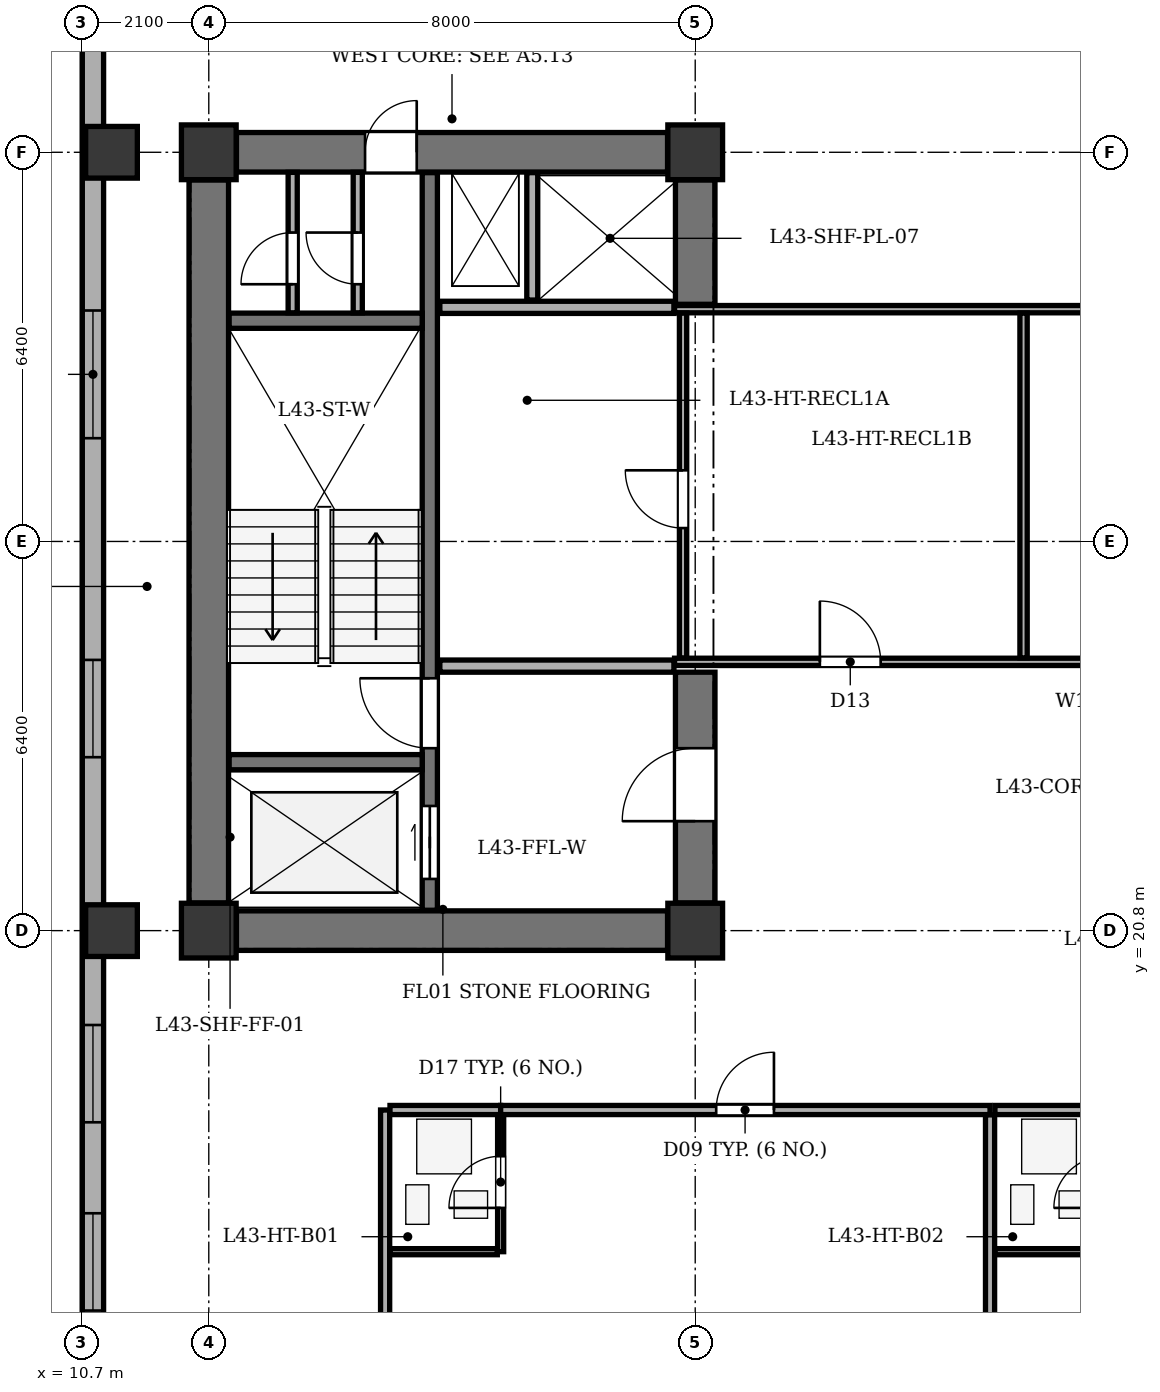
"""IFC4 building model, lengths in metres.
Left out: names, types, materials, properties, quantities, classifications, styles, units other than length and angle.
Written with IfcOpenShell. Run it as: python <this file> out.ifc"""

import sys

from ifc_helpers import new_model, si_unit, direction, frame, frame_2d, origin, origin_2d, place, context, subcontext, project, spatial, rectangle, extrude, element, fill, save


model = new_model("IFC4")
c1 = context("Model", 3, precision=1e-05, world=origin(), true_north=direction((0.0, 1.0)))
c2 = subcontext(c1, "Body", "Model", "MODEL_VIEW")
j1 = project(units=[si_unit("LENGTHUNIT", "METRE"), si_unit("PLANEANGLEUNIT", "RADIAN")], contexts=[c1])
p1 = place(None, origin())
s1 = spatial("IfcSite", under=j1, at=p1, CompositionType="ELEMENT")
p2 = place(p1, origin())
s2 = spatial("IfcBuilding", under=s1, at=p2, CompositionType="ELEMENT")
p3 = place(p2, frame((0.0, 0.0, 169.3)))
s3 = spatial("IfcBuildingStorey", under=s2, at=p3, CompositionType="ELEMENT", Elevation=169.3)
for number, where, z_axis, x_axis in (
    (1, (12.8, 20.8, 0.0), (0.0, 0.0, 1.0), (1.0, 0.0, 0.0)),
    (2, (20.8, 20.8, 0.0), (0.0, 0.0, 1.0), (1.0, 0.0, 0.0)),
    (3, (12.8, 33.6, 0.0), (0.0, 0.0, 1.0), (1.0, 0.0, 0.0)),
    (4, (20.8, 33.6, 0.0), (0.0, 0.0, 1.0), (1.0, 0.0, 0.0)),
):
    element("IfcColumn", number, at=place(p3, frame(where, z_axis=z_axis, x_axis=x_axis)), inside=s3, PredefinedType="COLUMN", context=c2, shape_type="SweptSolid", body=[
        extrude(rectangle(XDim=0.9, YDim=0.9, at=origin_2d()), origin(), (0.0, 0.0, 1.0), 3.5),
    ])
for number, where, z_axis, x_axis in (
    (5, (11.2, 20.8, 0.0), (0.0, 0.0, 1.0), (1.0, 0.0, 0.0)),
    (6, (11.2, 33.6, 0.0), (0.0, 0.0, 1.0), (1.0, 0.0, 0.0)),
):
    element("IfcColumn", number, at=place(p3, frame(where, z_axis=z_axis, x_axis=x_axis)), inside=s3, PredefinedType="COLUMN", context=c2, shape_type="SweptSolid", body=[
        extrude(rectangle(XDim=0.85, YDim=0.85, at=origin_2d()), origin(), (0.0, 0.0, 1.0), 3.5),
    ])
p4 = place(p3, frame((10.895, 12.9, 0.0), z_axis=(0.0, 0.0, 1.0), x_axis=(0.0, 1.0, 0.0)))
e7 = element("IfcWall", 7, at=p4, inside=s3, PredefinedType="STANDARD", context=c2, shape_type="SweptSolid", body=[
    extrude(rectangle(XDim=35.0, YDim=0.35, at=frame_2d((17.5, 0.0))), origin(), (0.0, 0.0, 1.0), 2.785),
])
p5 = place(p4, frame((1.652, 0.0, 0.75)))
e8 = element("IfcOpeningElement", 8, at=p5, cuts=e7, PredefinedType="OPENING", context=c2, shape_type="SweptSolid", body=[
    extrude(rectangle(XDim=1.6, YDim=1.75, at=frame_2d((0.8, 0.875))), frame((0.0, 0.185, 0.0), z_axis=(0.0, -1.0, 0.0), x_axis=(1.0, 0.0, 0.0)), (0.0, 0.0, 1.0), 0.37),
])
p6 = place(p4, frame((4.748, 0.0, 0.75)))
e9 = element("IfcOpeningElement", 9, at=p6, cuts=e7, PredefinedType="OPENING", context=c2, shape_type="SweptSolid", body=[
    extrude(rectangle(XDim=1.6, YDim=1.75, at=frame_2d((0.8, 0.875))), frame((0.0, 0.185, 0.0), z_axis=(0.0, -1.0, 0.0), x_axis=(1.0, 0.0, 0.0)), (0.0, 0.0, 1.0), 0.37),
])
p7 = place(p4, frame((10.752, 0.0, 0.75)))
e10 = element("IfcOpeningElement", 10, at=p7, cuts=e7, PredefinedType="OPENING", context=c2, shape_type="SweptSolid", body=[
    extrude(rectangle(XDim=1.6, YDim=1.75, at=frame_2d((0.8, 0.875))), frame((0.0, 0.185, 0.0), z_axis=(0.0, -1.0, 0.0), x_axis=(1.0, 0.0, 0.0)), (0.0, 0.0, 1.0), 0.37),
])
p8 = place(p4, frame((15.998, 0.0, 0.75)))
e11 = element("IfcOpeningElement", 11, at=p8, cuts=e7, PredefinedType="OPENING", context=c2, shape_type="SweptSolid", body=[
    extrude(rectangle(XDim=2.1, YDim=1.75, at=frame_2d((1.05, 0.875))), frame((0.0, 0.185, 0.0), z_axis=(0.0, -1.0, 0.0), x_axis=(1.0, 0.0, 0.0)), (0.0, 0.0, 1.0), 0.37),
])
p9 = place(p4, frame((23.916, 0.0, 0.75)))
e12 = element("IfcOpeningElement", 12, at=p9, cuts=e7, PredefinedType="OPENING", context=c2, shape_type="SweptSolid", body=[
    extrude(rectangle(XDim=1.6, YDim=1.75, at=frame_2d((0.8, 0.875))), frame((0.0, 0.185, 0.0), z_axis=(0.0, -1.0, 0.0), x_axis=(1.0, 0.0, 0.0)), (0.0, 0.0, 1.0), 0.37),
])
p10 = place(p4, frame((29.834, 0.0, 0.75)))
e13 = element("IfcOpeningElement", 13, at=p10, cuts=e7, PredefinedType="OPENING", context=c2, shape_type="SweptSolid", body=[
    extrude(rectangle(XDim=2.1, YDim=1.75, at=frame_2d((1.05, 0.875))), frame((0.0, 0.185, 0.0), z_axis=(0.0, -1.0, 0.0), x_axis=(1.0, 0.0, 0.0)), (0.0, 0.0, 1.0), 0.37),
])
p11 = place(p3, frame((12.8, 21.255, 0.0), z_axis=(0.0, 0.0, 1.0), x_axis=(0.0, 1.0, 0.0)))
e14 = element("IfcWall", 14, at=p11, inside=s3, PredefinedType="SHEAR", context=c2, shape_type="SweptSolid", body=[
    extrude(rectangle(XDim=11.89, YDim=0.65, at=frame_2d((5.945, 0.0))), origin(), (0.0, 0.0, 1.0), 3.2),
])
p12 = place(p3, frame((13.255, 20.8, 0.0), z_axis=(0.0, 0.0, 1.0), x_axis=(1.0, 0.0, 0.0)))
e15 = element("IfcWall", 15, at=p12, inside=s3, PredefinedType="SHEAR", context=c2, shape_type="SweptSolid", body=[
    extrude(rectangle(XDim=7.09, YDim=0.65, at=frame_2d((3.545, 0.0))), origin(), (0.0, 0.0, 1.0), 3.2),
])
p13 = place(p3, frame((13.255, 33.6, 0.0), z_axis=(0.0, 0.0, 1.0), x_axis=(1.0, 0.0, 0.0)))
e16 = element("IfcWall", 16, at=p13, inside=s3, PredefinedType="SHEAR", context=c2, shape_type="SweptSolid", body=[
    extrude(rectangle(XDim=7.09, YDim=0.65, at=frame_2d((3.545, 0.0))), origin(), (0.0, 0.0, 1.0), 3.2),
])
p14 = place(p13, frame((2.115, 0.0, 0.0)))
e17 = element("IfcOpeningElement", 17, at=p14, cuts=e16, PredefinedType="OPENING", context=c2, shape_type="SweptSolid", body=[
    extrude(rectangle(XDim=0.85, YDim=2.02, at=frame_2d((0.425, 1.01))), frame((0.0, 0.335, 0.0), z_axis=(0.0, -1.0, 0.0), x_axis=(1.0, 0.0, 0.0)), (0.0, 0.0, 1.0), 0.67),
])
p15 = place(p3, frame((20.8, 21.255, 0.0), z_axis=(0.0, 0.0, 1.0), x_axis=(0.0, 1.0, 0.0)))
e18 = element("IfcWall", 18, at=p15, inside=s3, PredefinedType="SHEAR", context=c2, shape_type="SweptSolid", body=[
    extrude(rectangle(XDim=3.795, YDim=0.65, at=frame_2d((1.897, 0.0))), origin(), (0.0, 0.0, 1.0), 3.2),
])
p16 = place(p15, frame((1.345, 0.0, 0.0)))
e19 = element("IfcOpeningElement", 19, at=p16, cuts=e18, PredefinedType="OPENING", context=c2, shape_type="SweptSolid", body=[
    extrude(rectangle(XDim=1.2, YDim=2.15, at=frame_2d((0.6, 1.075))), frame((0.0, 0.335, 0.0), z_axis=(0.0, -1.0, 0.0), x_axis=(1.0, 0.0, 0.0)), (0.0, 0.0, 1.0), 0.67),
])
p17 = place(p3, frame((20.8, 31.1, 0.0), z_axis=(0.0, 0.0, 1.0), x_axis=(0.0, 1.0, 0.0)))
e20 = element("IfcWall", 20, at=p17, inside=s3, PredefinedType="SHEAR", context=c2, shape_type="SweptSolid", body=[
    extrude(rectangle(XDim=2.045, YDim=0.65, at=frame_2d((1.022, 0.0))), origin(), (0.0, 0.0, 1.0), 3.2),
])
p18 = place(p3, frame((16.435, 21.135, 0.0), z_axis=(0.0, 0.0, 1.0), x_axis=(0.0, 1.0, 0.0)))
e21 = element("IfcWall", 21, at=p18, inside=s3, PredefinedType="SHEAR", context=c2, shape_type="SweptSolid", body=[
    extrude(rectangle(XDim=12.13, YDim=0.25, at=frame_2d((6.065, 0.0))), origin(), (0.0, 0.0, 1.0), 3.2),
])
p19 = place(p18, frame((0.515, 0.0, 0.0)))
e22 = element("IfcOpeningElement", 22, at=p19, cuts=e21, PredefinedType="OPENING", context=c2, shape_type="SweptSolid", body=[
    extrude(rectangle(XDim=1.2, YDim=2.15, at=frame_2d((0.6, 1.075))), frame((0.0, 0.135, 0.0), z_axis=(0.0, -1.0, 0.0), x_axis=(1.0, 0.0, 0.0)), (0.0, 0.0, 1.0), 0.27),
])
p20 = place(p18, frame((2.665, 0.0, 0.0)))
e23 = element("IfcOpeningElement", 23, at=p20, cuts=e21, PredefinedType="OPENING", context=c2, shape_type="SweptSolid", body=[
    extrude(rectangle(XDim=1.15, YDim=2.15, at=frame_2d((0.575, 1.075))), frame((0.0, 0.135, 0.0), z_axis=(0.0, -1.0, 0.0), x_axis=(1.0, 0.0, 0.0)), (0.0, 0.0, 1.0), 0.27),
])
for number, where, z_axis, x_axis in (
    (24, (13.135, 23.57, 0.0), (0.0, 0.0, 1.0), (1.0, 0.0, 0.0)),
    (25, (13.135, 30.83, 0.0), (0.0, 0.0, 1.0), (1.0, 0.0, 0.0)),
):
    element("IfcWall", number, at=place(p3, frame(where, z_axis=z_axis, x_axis=x_axis)), inside=s3, PredefinedType="SHEAR", context=c2, shape_type="SweptSolid", body=[
        extrude(rectangle(XDim=3.175, YDim=0.25, at=frame_2d((1.587, 0.0))), origin(), (0.0, 0.0, 1.0), 3.2),
    ])
for number, where, z_axis, x_axis in (
    (26, (16.6, 25.15, 0.0), (0.0, 0.0, 1.0), (1.0, 0.0, 0.0)),
    (27, (16.6, 31.05, 0.0), (0.0, 0.0, 1.0), (1.0, 0.0, 0.0)),
):
    element("IfcWall", number, at=place(p3, frame(where, z_axis=z_axis, x_axis=x_axis)), inside=s3, PredefinedType="SOLIDWALL", context=c2, shape_type="SweptSolid", body=[
        extrude(rectangle(XDim=3.85, YDim=0.2, at=frame_2d((1.925, 0.0))), origin(), (0.0, 0.0, 1.0), 3.2),
    ])
p21 = place(p3, frame((18.12, 31.17, 0.0), z_axis=(0.0, 0.0, 1.0), x_axis=(0.0, 1.0, 0.0)))
e28 = element("IfcWall", 28, at=p21, inside=s3, PredefinedType="PARTITIONING", context=c2, shape_type="SweptSolid", body=[
    extrude(rectangle(XDim=2.095, YDim=0.18, at=frame_2d((1.047, 0.0))), origin(), (0.0, 0.0, 1.0), 3.2),
])
p22 = place(p3, frame((14.18, 30.96, 0.0), z_axis=(0.0, 0.0, 1.0), x_axis=(0.0, 1.0, 0.0)))
e29 = element("IfcWall", 29, at=p22, inside=s3, PredefinedType="PARTITIONING", context=c2, shape_type="SweptSolid", body=[
    extrude(rectangle(XDim=2.31, YDim=0.15, at=frame_2d((1.155, 0.0))), origin(), (0.0, 0.0, 1.0), 3.2),
])
p23 = place(p22, frame((0.47, 0.0, 0.0)))
e30 = element("IfcOpeningElement", 30, at=p23, cuts=e29, PredefinedType="OPENING", context=c2, shape_type="SweptSolid", body=[
    extrude(rectangle(XDim=0.85, YDim=2.02, at=frame_2d((0.425, 1.01))), frame((0.0, 0.085, 0.0), z_axis=(0.0, -1.0, 0.0), x_axis=(1.0, 0.0, 0.0)), (0.0, 0.0, 1.0), 0.17),
])
p24 = place(p3, frame((15.25, 30.96, 0.0), z_axis=(0.0, 0.0, 1.0), x_axis=(0.0, 1.0, 0.0)))
e31 = element("IfcWall", 31, at=p24, inside=s3, PredefinedType="PARTITIONING", context=c2, shape_type="SweptSolid", body=[
    extrude(rectangle(XDim=2.31, YDim=0.15, at=frame_2d((1.155, 0.0))), origin(), (0.0, 0.0, 1.0), 3.2),
])
p25 = place(p24, frame((0.47, 0.0, 0.0)))
e32 = element("IfcOpeningElement", 32, at=p25, cuts=e31, PredefinedType="OPENING", context=c2, shape_type="SweptSolid", body=[
    extrude(rectangle(XDim=0.85, YDim=2.02, at=frame_2d((0.425, 1.01))), frame((0.0, 0.085, 0.0), z_axis=(0.0, -1.0, 0.0), x_axis=(1.0, 0.0, 0.0)), (0.0, 0.0, 1.0), 0.17),
])
p26 = place(p3, frame((20.46, 25.22, 0.0), z_axis=(0.0, 0.0, 1.0), x_axis=(1.0, 0.0, 0.0)))
e33 = element("IfcWall", 33, at=p26, inside=s3, PredefinedType="PARTITIONING", context=c2, shape_type="SweptSolid", body=[
    extrude(rectangle(XDim=11.94, YDim=0.12, at=frame_2d((5.97, 0.0))), origin(), (0.0, 0.0, 1.0), 3.2),
])
p27 = place(p26, frame((2.39, 0.0, 0.0)))
e34 = element("IfcOpeningElement", 34, at=p27, cuts=e33, PredefinedType="OPENING", context=c2, shape_type="SweptSolid", body=[
    extrude(rectangle(XDim=1.0, YDim=2.1, at=frame_2d((0.5, 1.05))), frame((0.0, 0.07, 0.0), z_axis=(0.0, -1.0, 0.0), x_axis=(1.0, 0.0, 0.0)), (0.0, 0.0, 1.0), 0.14),
])
p28 = place(p3, frame((20.46, 31.02, 0.0), z_axis=(0.0, 0.0, 1.0), x_axis=(1.0, 0.0, 0.0)))
e35 = element("IfcWall", 35, at=p28, inside=s3, PredefinedType="PARTITIONING", context=c2, shape_type="SweptSolid", body=[
    extrude(rectangle(XDim=11.94, YDim=0.12, at=frame_2d((5.97, 0.0))), origin(), (0.0, 0.0, 1.0), 3.2),
])
p29 = place(p3, frame((20.6, 25.285, 0.0), z_axis=(0.0, 0.0, 1.0), x_axis=(0.0, 1.0, 0.0)))
e36 = element("IfcWall", 36, at=p29, inside=s3, PredefinedType="PARTITIONING", context=c2, shape_type="SweptSolid", body=[
    extrude(rectangle(XDim=5.67, YDim=0.12, at=frame_2d((2.835, 0.0))), origin(), (0.0, 0.0, 1.0), 2.735),
])
p30 = place(p29, frame((2.135, 0.0, 0.0)))
e37 = element("IfcOpeningElement", 37, at=p30, cuts=e36, PredefinedType="OPENING", context=c2, shape_type="SweptSolid", body=[
    extrude(rectangle(XDim=0.95, YDim=2.1, at=frame_2d((0.475, 1.05))), frame((0.0, 0.07, 0.0), z_axis=(0.0, -1.0, 0.0), x_axis=(1.0, 0.0, 0.0)), (0.0, 0.0, 1.0), 0.14),
])
p31 = place(p3, frame((26.2, 25.285, 0.0), z_axis=(0.0, 0.0, 1.0), x_axis=(0.0, 1.0, 0.0)))
e38 = element("IfcWall", 38, at=p31, inside=s3, PredefinedType="PARTITIONING", context=c2, shape_type="SweptSolid", body=[
    extrude(rectangle(XDim=5.67, YDim=0.12, at=frame_2d((2.835, 0.0))), origin(), (0.0, 0.0, 1.0), 3.2),
])
p32 = place(p3, frame((15.7, 8.275, 0.0), z_axis=(0.0, 0.0, 1.0), x_axis=(0.0, 1.0, 0.0)))
e39 = element("IfcWall", 39, at=p32, inside=s3, PredefinedType="PARTITIONING", context=c2, shape_type="SweptSolid", body=[
    extrude(rectangle(XDim=9.575, YDim=0.15, at=frame_2d((4.788, 0.0))), origin(), (0.0, 0.0, 1.0), 3.2),
])
p33 = place(p3, frame((15.78, 17.85, 0.0), z_axis=(0.0, 0.0, 1.0), x_axis=(1.0, 0.0, 0.0)))
e40 = element("IfcWall", 40, at=p33, inside=s3, PredefinedType="PARTITIONING", context=c2, shape_type="SweptSolid", body=[
    extrude(rectangle(XDim=1.82, YDim=0.15, at=frame_2d((0.91, 0.0))), origin(), (0.0, 0.0, 1.0), 3.2),
])
p34 = place(p3, frame((17.6, 17.85, 0.0), z_axis=(0.0, 0.0, 1.0), x_axis=(1.0, 0.0, 0.0)))
e41 = element("IfcWall", 41, at=p34, inside=s3, PredefinedType="PARTITIONING", context=c2, shape_type="SweptSolid", body=[
    extrude(rectangle(XDim=8.049, YDim=0.15, at=frame_2d((4.024, 0.0))), origin(), (0.0, 0.0, 1.0), 3.2),
])
p35 = place(p34, frame((3.545, 0.0, 0.0)))
e42 = element("IfcOpeningElement", 42, at=p35, cuts=e41, PredefinedType="OPENING", context=c2, shape_type="SweptSolid", body=[
    extrude(rectangle(XDim=0.95, YDim=2.1, at=frame_2d((0.475, 1.05))), frame((0.0, 0.085, 0.0), z_axis=(0.0, -1.0, 0.0), x_axis=(1.0, 0.0, 0.0)), (0.0, 0.0, 1.0), 0.17),
])
p36 = place(p3, frame((17.6, 15.52, 0.0), z_axis=(0.0, 0.0, 1.0), x_axis=(0.0, 1.0, 0.0)))
e43 = element("IfcWall", 43, at=p36, inside=s3, PredefinedType="PARTITIONING", context=c2, shape_type="SweptSolid", body=[
    extrude(rectangle(XDim=2.25, YDim=0.1, at=frame_2d((1.125, 0.0))), origin(), (0.0, 0.0, 1.0), 3.2),
])
p37 = place(p36, frame((0.72, 0.0, 0.0)))
e44 = element("IfcOpeningElement", 44, at=p37, cuts=e43, PredefinedType="OPENING", context=c2, shape_type="SweptSolid", body=[
    extrude(rectangle(XDim=0.85, YDim=2.05, at=frame_2d((0.425, 1.025))), frame((0.0, 0.06, 0.0), z_axis=(0.0, -1.0, 0.0), x_axis=(1.0, 0.0, 0.0)), (0.0, 0.0, 1.0), 0.12),
])
p38 = place(p3, frame((15.78, 15.52, 0.0), z_axis=(0.0, 0.0, 1.0), x_axis=(1.0, 0.0, 0.0)))
e45 = element("IfcWall", 45, at=p38, inside=s3, PredefinedType="PARTITIONING", context=c2, shape_type="SweptSolid", body=[
    extrude(rectangle(XDim=1.765, YDim=0.1, at=frame_2d((0.882, 0.0))), origin(), (0.0, 0.0, 1.0), 3.2),
])
p39 = place(p3, frame((25.649, 8.275, 0.0), z_axis=(0.0, 0.0, 1.0), x_axis=(0.0, 1.0, 0.0)))
e46 = element("IfcWall", 46, at=p39, inside=s3, PredefinedType="PARTITIONING", context=c2, shape_type="SweptSolid", body=[
    extrude(rectangle(XDim=9.495, YDim=0.15, at=frame_2d((4.748, 0.0))), origin(), (0.0, 0.0, 1.0), 3.2),
])
p40 = place(p3, frame((25.729, 17.85, 0.0), z_axis=(0.0, 0.0, 1.0), x_axis=(1.0, 0.0, 0.0)))
e47 = element("IfcWall", 47, at=p40, inside=s3, PredefinedType="PARTITIONING", context=c2, shape_type="SweptSolid", body=[
    extrude(rectangle(XDim=1.82, YDim=0.15, at=frame_2d((0.91, 0.0))), origin(), (0.0, 0.0, 1.0), 3.2),
])
p41 = place(p3, frame((25.729, 15.52, 0.0), z_axis=(0.0, 0.0, 1.0), x_axis=(1.0, 0.0, 0.0)))
e48 = element("IfcWall", 48, at=p41, inside=s3, PredefinedType="PARTITIONING", context=c2, shape_type="SweptSolid", body=[
    extrude(rectangle(XDim=1.765, YDim=0.1, at=frame_2d((0.882, 0.0))), origin(), (0.0, 0.0, 1.0), 3.2),
])
p42 = place(p5, origin())
e49 = element("IfcWindow", 49, at=p42, inside=s3, PartitioningType="SINGLE_PANEL", PredefinedType="WINDOW", context=c2, shape_type="SweptSolid", body=[
    extrude(rectangle(XDim=1.6, YDim=1.75, at=frame_2d((0.8, 0.875))), frame((0.0, -0.01, 0.0), z_axis=(0.0, -1.0, 0.0), x_axis=(1.0, 0.0, 0.0)), (0.0, 0.0, 1.0), 0.06),
])
fill(e8, e49)
p43 = place(p6, origin())
e50 = element("IfcWindow", 50, at=p43, inside=s3, PartitioningType="SINGLE_PANEL", PredefinedType="WINDOW", context=c2, shape_type="SweptSolid", body=[
    extrude(rectangle(XDim=1.6, YDim=1.75, at=frame_2d((0.8, 0.875))), frame((0.0, -0.01, 0.0), z_axis=(0.0, -1.0, 0.0), x_axis=(1.0, 0.0, 0.0)), (0.0, 0.0, 1.0), 0.06),
])
fill(e9, e50)
p44 = place(p7, origin())
e51 = element("IfcWindow", 51, at=p44, inside=s3, PartitioningType="SINGLE_PANEL", PredefinedType="WINDOW", context=c2, shape_type="SweptSolid", body=[
    extrude(rectangle(XDim=1.6, YDim=1.75, at=frame_2d((0.8, 0.875))), frame((0.0, -0.01, 0.0), z_axis=(0.0, -1.0, 0.0), x_axis=(1.0, 0.0, 0.0)), (0.0, 0.0, 1.0), 0.06),
])
fill(e10, e51)
p45 = place(p8, origin())
e52 = element("IfcWindow", 52, at=p45, inside=s3, PartitioningType="SINGLE_PANEL", PredefinedType="WINDOW", context=c2, shape_type="SweptSolid", body=[
    extrude(rectangle(XDim=2.1, YDim=1.75, at=frame_2d((1.05, 0.875))), frame((0.0, -0.01, 0.0), z_axis=(0.0, -1.0, 0.0), x_axis=(1.0, 0.0, 0.0)), (0.0, 0.0, 1.0), 0.06),
])
fill(e11, e52)
p46 = place(p14, origin())
e53 = element("IfcDoor", 53, at=p46, inside=s3, OperationType="SINGLE_SWING_RIGHT", PredefinedType="DOOR", context=c2, shape_type="SweptSolid", body=[
    extrude(rectangle(XDim=0.85, YDim=2.02, at=frame_2d((0.425, 1.01))), frame((0.0, 0.025, 0.0), z_axis=(0.0, -1.0, 0.0), x_axis=(1.0, 0.0, 0.0)), (0.0, 0.0, 1.0), 0.05),
])
fill(e17, e53)
p47 = place(p16, origin())
e54 = element("IfcDoor", 54, at=p47, inside=s3, OperationType="SINGLE_SWING_LEFT", PredefinedType="DOOR", context=c2, shape_type="SweptSolid", body=[
    extrude(rectangle(XDim=1.2, YDim=2.15, at=frame_2d((0.6, 1.075))), frame((0.0, 0.025, 0.0), z_axis=(0.0, -1.0, 0.0), x_axis=(1.0, 0.0, 0.0)), (0.0, 0.0, 1.0), 0.05),
])
fill(e19, e54)
p48 = place(p19, origin())
e55 = element("IfcDoor", 55, at=p48, inside=s3, OperationType="DOUBLE_DOOR_SLIDING", PredefinedType="DOOR", context=c2, shape_type="SweptSolid", body=[
    extrude(rectangle(XDim=1.2, YDim=2.15, at=frame_2d((0.6, 1.075))), frame((0.0, 0.025, 0.0), z_axis=(0.0, -1.0, 0.0), x_axis=(1.0, 0.0, 0.0)), (0.0, 0.0, 1.0), 0.05),
])
fill(e22, e55)
p49 = place(p20, origin())
e56 = element("IfcDoor", 56, at=p49, inside=s3, OperationType="SINGLE_SWING_RIGHT", PredefinedType="DOOR", context=c2, shape_type="SweptSolid", body=[
    extrude(rectangle(XDim=1.15, YDim=2.15, at=frame_2d((0.575, 1.075))), frame((0.0, 0.025, 0.0), z_axis=(0.0, -1.0, 0.0), x_axis=(1.0, 0.0, 0.0)), (0.0, 0.0, 1.0), 0.05),
])
fill(e23, e56)
p50 = place(p23, origin())
e57 = element("IfcDoor", 57, at=p50, inside=s3, OperationType="SINGLE_SWING_LEFT", PredefinedType="DOOR", context=c2, shape_type="SweptSolid", body=[
    extrude(rectangle(XDim=0.85, YDim=2.02, at=frame_2d((0.425, 1.01))), frame((0.0, 0.025, 0.0), z_axis=(0.0, -1.0, 0.0), x_axis=(1.0, 0.0, 0.0)), (0.0, 0.0, 1.0), 0.05),
])
fill(e30, e57)
p51 = place(p25, origin())
e58 = element("IfcDoor", 58, at=p51, inside=s3, OperationType="SINGLE_SWING_RIGHT", PredefinedType="DOOR", context=c2, shape_type="SweptSolid", body=[
    extrude(rectangle(XDim=0.85, YDim=2.02, at=frame_2d((0.425, 1.01))), frame((0.0, 0.025, 0.0), z_axis=(0.0, -1.0, 0.0), x_axis=(1.0, 0.0, 0.0)), (0.0, 0.0, 1.0), 0.05),
])
fill(e32, e58)
p52 = place(p30, origin())
e59 = element("IfcDoor", 59, at=p52, inside=s3, OperationType="SINGLE_SWING_RIGHT", PredefinedType="DOOR", context=c2, shape_type="SweptSolid", body=[
    extrude(rectangle(XDim=0.95, YDim=2.1, at=frame_2d((0.475, 1.05))), frame((0.0, 0.025, 0.0), z_axis=(0.0, -1.0, 0.0), x_axis=(1.0, 0.0, 0.0)), (0.0, 0.0, 1.0), 0.05),
])
fill(e37, e59)
p53 = place(p27, origin())
e60 = element("IfcDoor", 60, at=p53, inside=s3, OperationType="SINGLE_SWING_LEFT", PredefinedType="DOOR", context=c2, shape_type="SweptSolid", body=[
    extrude(rectangle(XDim=1.0, YDim=2.1, at=frame_2d((0.5, 1.05))), frame((0.0, 0.025, 0.0), z_axis=(0.0, -1.0, 0.0), x_axis=(1.0, 0.0, 0.0)), (0.0, 0.0, 1.0), 0.05),
])
fill(e34, e60)
p54 = place(p37, origin())
e61 = element("IfcDoor", 61, at=p54, inside=s3, OperationType="SINGLE_SWING_LEFT", PredefinedType="DOOR", context=c2, shape_type="SweptSolid", body=[
    extrude(rectangle(XDim=0.85, YDim=2.05, at=frame_2d((0.425, 1.025))), frame((0.0, 0.025, 0.0), z_axis=(0.0, -1.0, 0.0), x_axis=(1.0, 0.0, 0.0)), (0.0, 0.0, 1.0), 0.05),
])
fill(e44, e61)
p55 = place(p35, origin())
e62 = element("IfcDoor", 62, at=p55, inside=s3, OperationType="SINGLE_SWING_RIGHT", PredefinedType="DOOR", context=c2, shape_type="SweptSolid", body=[
    extrude(rectangle(XDim=0.95, YDim=2.1, at=frame_2d((0.475, 1.05))), frame((0.0, 0.025, 0.0), z_axis=(0.0, -1.0, 0.0), x_axis=(1.0, 0.0, 0.0)), (0.0, 0.0, 1.0), 0.05),
])
fill(e42, e62)
save(model, sys.argv[1])
